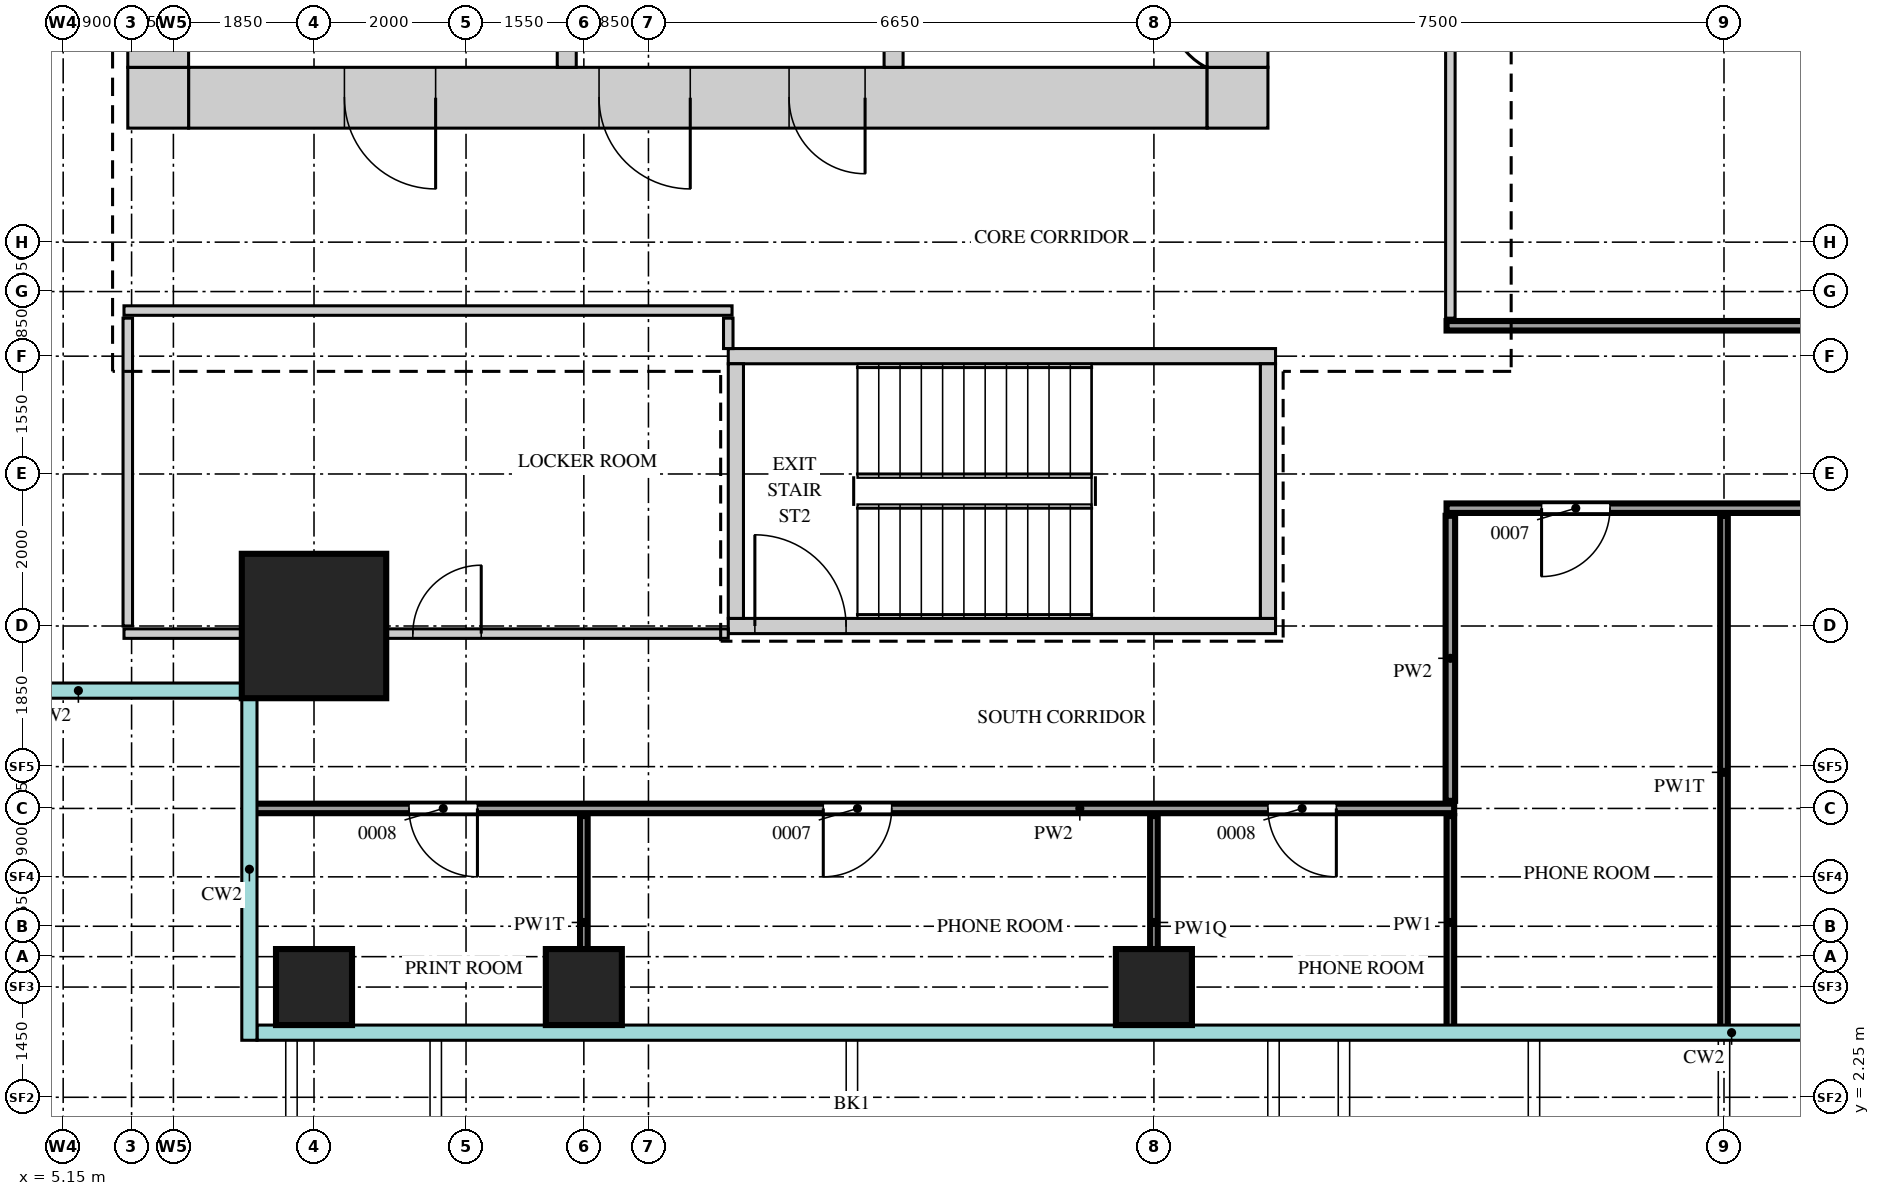
"""IFC4 building model, lengths in metres.
Left out: names, types, materials, properties, quantities, classifications, styles, units other than length and angle.
Written with IfcOpenShell. Run it as: python <this file> out.ifc"""

import sys

from ifc_helpers import new_model, si_unit, direction, frame, frame_2d, origin, origin_2d, place, context, subcontext, project, spatial, rectangle, extrude, source, transform, mapped, element, fill, save


model = new_model("IFC4")
c1 = context("Model", 3, precision=1e-05, world=origin(), true_north=direction((0.0, 1.0)))
c2 = subcontext(c1, "Body", "Model", "MODEL_VIEW")
j1 = project(units=[si_unit("LENGTHUNIT", "METRE"), si_unit("PLANEANGLEUNIT", "RADIAN")], contexts=[c1])
p1 = place(None, origin())
s1 = spatial("IfcSite", under=j1, at=p1, CompositionType="ELEMENT")
p2 = place(p1, origin())
s2 = spatial("IfcBuilding", under=s1, at=p2, CompositionType="ELEMENT")
p3 = place(p2, frame((0.0, 0.0, 188.7)))
s3 = spatial("IfcBuildingStorey", under=s2, at=p3, CompositionType="ELEMENT", Elevation=188.7)
m1 = source(origin(), c2, "Body", "SweptSolid", [
    extrude(rectangle(XDim=13.4, YDim=0.8, at=frame_2d((6.7, 0.0))), origin(), (0.0, 0.0, 1.0), 3.75),
])
p4 = place(p3, frame((6.8, 15.4, 0.0), z_axis=(0.0, 0.0, 1.0), x_axis=(1.0, 0.0, 0.0)))
e1 = element("IfcWall", 1, at=p4, inside=s3, PredefinedType="SHEAR", context=c2, shape_type="MappedRepresentation", body=[
    mapped(m1, transform((0.0, 0.0, 0.0))),
])
m2 = source(origin(), c2, "Body", "SweptSolid", [
    extrude(rectangle(XDim=1.2, YDim=2.1, at=frame_2d((0.6, 1.05))), frame((0.0, 0.41, 0.0), z_axis=(0.0, -1.0, 0.0), x_axis=(1.0, 0.0, 0.0)), (0.0, 0.0, 1.0), 0.82),
])
p5 = place(p4, frame((5.4, 0.0, 0.0)))
e2 = element("IfcOpeningElement", 2, at=p5, cuts=e1, PredefinedType="OPENING", context=c2, shape_type="MappedRepresentation", body=[
    mapped(m2, transform((0.0, 0.0, 0.0))),
])
p6 = place(p4, frame((2.05, 0.0, 0.0)))
e3 = element("IfcOpeningElement", 3, at=p6, cuts=e1, PredefinedType="OPENING", context=c2, shape_type="MappedRepresentation", body=[
    mapped(m2, transform((0.0, 0.0, 0.0))),
])
m3 = source(origin(), c2, "Body", "SweptSolid", [
    extrude(rectangle(XDim=1.0, YDim=2.1, at=frame_2d((0.5, 1.05))), frame((0.0, 0.41, 0.0), z_axis=(0.0, -1.0, 0.0), x_axis=(1.0, 0.0, 0.0)), (0.0, 0.0, 1.0), 0.82),
])
p7 = place(p4, frame((7.9, 0.0, 0.0)))
e4 = element("IfcOpeningElement", 4, at=p7, cuts=e1, PredefinedType="OPENING", context=c2, shape_type="MappedRepresentation", body=[
    mapped(m3, transform((0.0, 0.0, 0.0))),
])
m4 = source(origin(), c2, "Body", "SweptSolid", [
    extrude(rectangle(XDim=0.8, YDim=0.8, at=frame_2d((0.4, 0.0))), origin(), (0.0, 0.0, 1.0), 3.75),
])
for number, where, z_axis, x_axis in (
    (5, (20.2, 15.4, 0.0), (0.0, 0.0, 1.0), (1.0, 0.0, 0.0)),
    (6, (6.0, 15.4, 0.0), (0.0, 0.0, 1.0), (1.0, 0.0, 0.0)),
):
    element("IfcWall", number, at=place(p3, frame(where, z_axis=z_axis, x_axis=x_axis)), inside=s3, PredefinedType="SHEAR", context=c2, shape_type="MappedRepresentation", body=[
        mapped(m4, transform((0.0, 0.0, 0.0))),
    ])
m5 = source(origin(), c2, "Body", "SweptSolid", [
    extrude(rectangle(XDim=22.4, YDim=0.8, at=frame_2d((11.2, 0.0))), origin(), (0.0, 0.0, 1.0), 3.75),
])
p8 = place(p3, frame((20.6, 15.8, 0.0), z_axis=(0.0, 0.0, 1.0), x_axis=(0.0, 1.0, 0.0)))
e7 = element("IfcWall", 7, at=p8, inside=s3, PredefinedType="SHEAR", context=c2, shape_type="MappedRepresentation", body=[
    mapped(m5, transform((0.0, 0.0, 0.0))),
])
m6 = source(origin(), c2, "Body", "SweptSolid", [
    extrude(rectangle(XDim=1.8, YDim=2.1, at=frame_2d((0.9, 1.05))), frame((0.0, 0.41, 0.0), z_axis=(0.0, -1.0, 0.0), x_axis=(1.0, 0.0, 0.0)), (0.0, 0.0, 1.0), 0.82),
])
p9 = place(p8, frame((10.7, 0.0, 0.0)))
e8 = element("IfcOpeningElement", 8, at=p9, cuts=e7, PredefinedType="OPENING", context=c2, shape_type="MappedRepresentation", body=[
    mapped(m6, transform((0.0, 0.0, 0.0))),
])
m7 = source(origin(), c2, "Body", "SweptSolid", [
    extrude(rectangle(XDim=0.9, YDim=2.1, at=frame_2d((0.45, 1.05))), frame((0.0, 0.41, 0.0), z_axis=(0.0, -1.0, 0.0), x_axis=(1.0, 0.0, 0.0)), (0.0, 0.0, 1.0), 0.82),
])
p10 = place(p8, frame((0.35, 0.0, 0.0)))
e9 = element("IfcOpeningElement", 9, at=p10, cuts=e7, PredefinedType="OPENING", context=c2, shape_type="MappedRepresentation", body=[
    mapped(m7, transform((0.0, 0.0, 0.0))),
])
p11 = place(p8, frame((2.15, 0.0, 0.0)))
e10 = element("IfcOpeningElement", 10, at=p11, cuts=e7, PredefinedType="OPENING", context=c2, shape_type="MappedRepresentation", body=[
    mapped(m7, transform((0.0, 0.0, 0.0))),
])
p12 = place(p8, frame((4.85, 0.0, 0.0)))
e11 = element("IfcOpeningElement", 11, at=p12, cuts=e7, PredefinedType="OPENING", context=c2, shape_type="MappedRepresentation", body=[
    mapped(m3, transform((0.0, 0.0, 0.0))),
])
p13 = place(p3, frame((6.4, 15.8, 0.0), z_axis=(0.0, 0.0, 1.0), x_axis=(0.0, 1.0, 0.0)))
e12 = element("IfcWall", 12, at=p13, inside=s3, PredefinedType="SHEAR", context=c2, shape_type="MappedRepresentation", body=[
    mapped(m5, transform((0.0, 0.0, 0.0))),
])
m8 = source(origin(), c2, "Body", "SweptSolid", [
    extrude(rectangle(XDim=7.2, YDim=0.2, at=frame_2d((3.6, 0.0))), origin(), (0.0, 0.0, 1.0), 3.75),
])
p14 = place(p3, frame((13.9, 12.0, 0.0), z_axis=(0.0, 0.0, 1.0), x_axis=(1.0, 0.0, 0.0)))
e13 = element("IfcWall", 13, at=p14, inside=s3, PredefinedType="SHEAR", context=c2, shape_type="MappedRepresentation", body=[
    mapped(m8, transform((0.0, 0.0, 0.0))),
])
p15 = place(p3, frame((13.9, 8.45, 0.0), z_axis=(0.0, 0.0, 1.0), x_axis=(1.0, 0.0, 0.0)))
e14 = element("IfcWall", 14, at=p15, inside=s3, PredefinedType="SHEAR", context=c2, shape_type="MappedRepresentation", body=[
    mapped(m8, transform((0.0, 0.0, 0.0))),
])
m9 = source(origin(), c2, "Body", "SweptSolid", [
    extrude(rectangle(XDim=1.2, YDim=2.1, at=frame_2d((0.6, 1.05))), frame((0.0, 0.11, 0.0), z_axis=(0.0, -1.0, 0.0), x_axis=(1.0, 0.0, 0.0)), (0.0, 0.0, 1.0), 0.22),
])
p16 = place(p15, frame((0.35, 0.0, 0.0)))
e15 = element("IfcOpeningElement", 15, at=p16, cuts=e14, PredefinedType="OPENING", context=c2, shape_type="MappedRepresentation", body=[
    mapped(m9, transform((0.0, 0.0, 0.0))),
])
m10 = source(origin(), c2, "Body", "SweptSolid", [
    extrude(rectangle(XDim=3.35, YDim=0.2, at=frame_2d((1.675, 0.0))), origin(), (0.0, 0.0, 1.0), 3.75),
])
for number, where, z_axis, x_axis in (
    (16, (21.0, 8.55, 0.0), (0.0, 0.0, 1.0), (0.0, 1.0, 0.0)),
    (17, (14.0, 8.55, 0.0), (0.0, 0.0, 1.0), (0.0, 1.0, 0.0)),
):
    element("IfcWall", number, at=place(p3, frame(where, z_axis=z_axis, x_axis=x_axis)), inside=s3, PredefinedType="SHEAR", context=c2, shape_type="MappedRepresentation", body=[
        mapped(m10, transform((0.0, 0.0, 0.0))),
    ])
m11 = source(origin(), c2, "Body", "SweptSolid", [
    extrude(rectangle(XDim=3.4, YDim=0.25, at=frame_2d((1.7, 0.0))), origin(), (0.0, 0.0, 1.0), 3.75),
])
for number, where, z_axis, x_axis in (
    (18, (16.075, 15.8, 0.0), (0.0, 0.0, 1.0), (0.0, 1.0, 0.0)),
    (19, (11.775, 15.8, 0.0), (0.0, 0.0, 1.0), (0.0, 1.0, 0.0)),
):
    element("IfcWall", number, at=place(p3, frame(where, z_axis=z_axis, x_axis=x_axis)), inside=s3, PredefinedType="STANDARD", context=c2, shape_type="MappedRepresentation", body=[
        mapped(m11, transform((0.0, 0.0, 0.0))),
    ])
m12 = source(origin(), c2, "Body", "SweptSolid", [
    extrude(rectangle(XDim=1.9, YDim=1.9, at=origin_2d()), origin(), (0.0, 0.0, 1.0), 4.0),
])
p17 = place(p3, frame((8.45, 8.45, 0.0), z_axis=(0.0, 0.0, 1.0), x_axis=(1.0, 0.0, 0.0)))
e20 = element("IfcColumn", 20, at=p17, inside=s3, PredefinedType="COLUMN", context=c2, shape_type="MappedRepresentation", body=[
    mapped(m12, transform((0.0, 0.0, 0.0))),
])
m13 = source(origin(), c2, "Body", "SweptSolid", [
    extrude(rectangle(XDim=1.0, YDim=1.0, at=origin_2d()), origin(), (0.0, 0.0, 1.0), 3.75),
])
for number, where, z_axis, x_axis in (
    (21, (8.45, 3.7, 0.0), (0.0, 0.0, 1.0), (1.0, 0.0, 0.0)),
    (22, (12.0, 3.7, 0.0), (0.0, 0.0, 1.0), (1.0, 0.0, 0.0)),
    (23, (19.5, 3.7, 0.0), (0.0, 0.0, 1.0), (1.0, 0.0, 0.0)),
):
    element("IfcColumn", number, at=place(p3, frame(where, z_axis=z_axis, x_axis=x_axis)), inside=s3, PredefinedType="COLUMN", context=c2, shape_type="MappedRepresentation", body=[
        mapped(m13, transform((0.0, 0.0, 0.0))),
    ])
m14 = source(origin(), c2, "Body", "SweptSolid", [
    extrude(rectangle(XDim=2.8, YDim=0.1, at=frame_2d((1.4, 0.0))), origin(), (0.0, 0.0, 1.0), 3.3),
])
p18 = place(p3, frame((12.0, 3.15, 0.0), z_axis=(0.0, 0.0, 1.0), x_axis=(0.0, 1.0, 0.0)))
e24 = element("IfcWall", 24, at=p18, inside=s3, PredefinedType="PARTITIONING", context=c2, shape_type="MappedRepresentation", body=[
    mapped(m14, transform((0.0, 0.0, 0.0))),
])
m15 = source(origin(), c2, "Body", "SweptSolid", [
    extrude(rectangle(XDim=2.8, YDim=0.1, at=frame_2d((1.4, 0.0))), origin(), (0.0, 0.0, 1.0), 3.42),
])
p19 = place(p3, frame((19.5, 3.15, 0.0), z_axis=(0.0, 0.0, 1.0), x_axis=(0.0, 1.0, 0.0)))
e25 = element("IfcWall", 25, at=p19, inside=s3, PredefinedType="PARTITIONING", context=c2, shape_type="MappedRepresentation", body=[
    mapped(m15, transform((0.0, 0.0, 0.0))),
])
m16 = source(origin(), c2, "Body", "SweptSolid", [
    extrude(rectangle(XDim=2.8, YDim=0.1, at=frame_2d((1.4, 0.0))), origin(), (0.0, 0.0, 1.0), 3.8),
])
p20 = place(p3, frame((23.4, 3.15, 0.0), z_axis=(0.0, 0.0, 1.0), x_axis=(0.0, 1.0, 0.0)))
e26 = element("IfcWall", 26, at=p20, inside=s3, PredefinedType="PARTITIONING", context=c2, shape_type="MappedRepresentation", body=[
    mapped(m16, transform((0.0, 0.0, 0.0))),
])
m17 = source(origin(), c2, "Body", "SweptSolid", [
    extrude(rectangle(XDim=6.75, YDim=0.1, at=frame_2d((3.375, 0.0))), origin(), (0.0, 0.0, 1.0), 3.3),
])
p21 = place(p3, frame((27.0, 3.15, 0.0), z_axis=(0.0, 0.0, 1.0), x_axis=(0.0, 1.0, 0.0)))
e27 = element("IfcWall", 27, at=p21, inside=s3, PredefinedType="PARTITIONING", context=c2, shape_type="MappedRepresentation", body=[
    mapped(m17, transform((0.0, 0.0, 0.0))),
])
m18 = source(origin(), c2, "Body", "SweptSolid", [
    extrude(rectangle(XDim=15.8, YDim=0.125, at=frame_2d((7.9, 0.0))), origin(), (0.0, 0.0, 1.0), 3.8),
])
p22 = place(p3, frame((7.65, 6.05, 0.0), z_axis=(0.0, 0.0, 1.0), x_axis=(1.0, 0.0, 0.0)))
e28 = element("IfcWall", 28, at=p22, inside=s3, PredefinedType="PARTITIONING", context=c2, shape_type="MappedRepresentation", body=[
    mapped(m18, transform((0.0, 0.0, 0.0))),
])
m19 = source(origin(), c2, "Body", "SweptSolid", [
    extrude(rectangle(XDim=0.9, YDim=2.1, at=frame_2d((0.45, 1.05))), frame((0.0, 0.073, 0.0), z_axis=(0.0, -1.0, 0.0), x_axis=(1.0, 0.0, 0.0)), (0.0, 0.0, 1.0), 0.145),
])
p23 = place(p22, frame((2.05, 0.0, 0.0)))
e29 = element("IfcOpeningElement", 29, at=p23, cuts=e28, PredefinedType="OPENING", context=c2, shape_type="MappedRepresentation", body=[
    mapped(m19, transform((0.0, 0.0, 0.0))),
])
p24 = place(p22, frame((7.5, 0.0, 0.0)))
e30 = element("IfcOpeningElement", 30, at=p24, cuts=e28, PredefinedType="OPENING", context=c2, shape_type="MappedRepresentation", body=[
    mapped(m19, transform((0.0, 0.0, 0.0))),
])
p25 = place(p22, frame((13.35, 0.0, 0.0)))
e31 = element("IfcOpeningElement", 31, at=p25, cuts=e28, PredefinedType="OPENING", context=c2, shape_type="MappedRepresentation", body=[
    mapped(m19, transform((0.0, 0.0, 0.0))),
])
m20 = source(origin(), c2, "Body", "SweptSolid", [
    extrude(rectangle(XDim=3.75, YDim=0.125, at=frame_2d((1.875, 0.0))), origin(), (0.0, 0.0, 1.0), 3.8),
])
p26 = place(p3, frame((23.4, 6.15, 0.0), z_axis=(0.0, 0.0, 1.0), x_axis=(0.0, 1.0, 0.0)))
e32 = element("IfcWall", 32, at=p26, inside=s3, PredefinedType="PARTITIONING", context=c2, shape_type="MappedRepresentation", body=[
    mapped(m20, transform((0.0, 0.0, 0.0))),
])
m21 = source(origin(), c2, "Body", "SweptSolid", [
    extrude(rectangle(XDim=7.95, YDim=0.125, at=frame_2d((3.975, 0.0))), origin(), (0.0, 0.0, 1.0), 3.25),
])
p27 = place(p3, frame((5.95, 8.35, 0.0), z_axis=(0.0, 0.0, 1.0), x_axis=(1.0, 0.0, 0.0)))
e33 = element("IfcWall", 33, at=p27, inside=s3, PredefinedType="PARTITIONING", context=c2, shape_type="MappedRepresentation", body=[
    mapped(m21, transform((0.0, 0.0, 0.0))),
])
p28 = place(p27, frame((3.8, 0.0, 0.0)))
e34 = element("IfcOpeningElement", 34, at=p28, cuts=e33, PredefinedType="OPENING", context=c2, shape_type="MappedRepresentation", body=[
    mapped(m19, transform((0.0, 0.0, 0.0))),
])
m22 = source(origin(), c2, "Body", "SweptSolid", [
    extrude(rectangle(XDim=4.05, YDim=0.125, at=frame_2d((2.025, 0.0))), origin(), (0.0, 0.0, 1.0), 3.8),
])
p29 = place(p3, frame((6.0, 8.45, 0.0), z_axis=(0.0, 0.0, 1.0), x_axis=(0.0, 1.0, 0.0)))
e35 = element("IfcWall", 35, at=p29, inside=s3, PredefinedType="PARTITIONING", context=c2, shape_type="MappedRepresentation", body=[
    mapped(m22, transform((0.0, 0.0, 0.0))),
])
m23 = source(origin(), c2, "Body", "SweptSolid", [
    extrude(rectangle(XDim=20.6, YDim=0.125, at=frame_2d((10.3, 0.0))), origin(), (0.0, 0.0, 1.0), 3.8),
])
p30 = place(p3, frame((23.35, 10.0, 0.0), z_axis=(0.0, 0.0, 1.0), x_axis=(1.0, 0.0, 0.0)))
e36 = element("IfcWall", 36, at=p30, inside=s3, PredefinedType="PARTITIONING", context=c2, shape_type="MappedRepresentation", body=[
    mapped(m23, transform((0.0, 0.0, 0.0))),
])
p31 = place(p30, frame((1.25, 0.0, 0.0)))
e37 = element("IfcOpeningElement", 37, at=p31, cuts=e36, PredefinedType="OPENING", context=c2, shape_type="MappedRepresentation", body=[
    mapped(m19, transform((0.0, 0.0, 0.0))),
])
m24 = source(origin(), c2, "Body", "SweptSolid", [
    extrude(rectangle(XDim=1.2, YDim=2.1, at=frame_2d((0.6, 1.05))), frame((0.0, 0.073, 0.0), z_axis=(0.0, -1.0, 0.0), x_axis=(1.0, 0.0, 0.0)), (0.0, 0.0, 1.0), 0.145),
])
p32 = place(p30, frame((10.55, 0.0, 0.0)))
e38 = element("IfcOpeningElement", 38, at=p32, cuts=e36, PredefinedType="OPENING", context=c2, shape_type="MappedRepresentation", body=[
    mapped(m24, transform((0.0, 0.0, 0.0))),
])
p33 = place(p30, frame((19.05, 0.0, 0.0)))
e39 = element("IfcOpeningElement", 39, at=p33, cuts=e36, PredefinedType="OPENING", context=c2, shape_type="MappedRepresentation", body=[
    mapped(m24, transform((0.0, 0.0, 0.0))),
])
m25 = source(origin(), c2, "Body", "SweptSolid", [
    extrude(rectangle(XDim=0.4, YDim=0.125, at=frame_2d((0.2, 0.0))), origin(), (0.0, 0.0, 1.0), 3.8),
])
p34 = place(p3, frame((13.9, 12.1, 0.0), z_axis=(0.0, 0.0, 1.0), x_axis=(0.0, 1.0, 0.0)))
e40 = element("IfcWall", 40, at=p34, inside=s3, PredefinedType="PARTITIONING", context=c2, shape_type="MappedRepresentation", body=[
    mapped(m25, transform((0.0, 0.0, 0.0))),
])
m26 = source(origin(), c2, "Body", "SweptSolid", [
    extrude(rectangle(XDim=18.3, YDim=0.125, at=frame_2d((9.15, 0.0))), origin(), (0.0, 0.0, 1.0), 3.8),
])
p35 = place(p3, frame((23.35, 12.4, 0.0), z_axis=(0.0, 0.0, 1.0), x_axis=(1.0, 0.0, 0.0)))
e41 = element("IfcWall", 41, at=p35, inside=s3, PredefinedType="PARTITIONING", context=c2, shape_type="MappedRepresentation", body=[
    mapped(m26, transform((0.0, 0.0, 0.0))),
])
m27 = source(origin(), c2, "Body", "SweptSolid", [
    extrude(rectangle(XDim=23.4, YDim=0.125, at=frame_2d((11.7, 0.0))), origin(), (0.0, 0.0, 1.0), 3.8),
])
p36 = place(p3, frame((23.4, 12.5, 0.0), z_axis=(0.0, 0.0, 1.0), x_axis=(0.0, 1.0, 0.0)))
e42 = element("IfcWall", 42, at=p36, inside=s3, PredefinedType="PARTITIONING", context=c2, shape_type="MappedRepresentation", body=[
    mapped(m27, transform((0.0, 0.0, 0.0))),
])
p37 = place(p36, frame((6.6, 0.0, 0.0)))
e43 = element("IfcOpeningElement", 43, at=p37, cuts=e42, PredefinedType="OPENING", context=c2, shape_type="MappedRepresentation", body=[
    mapped(m24, transform((0.0, 0.0, 0.0))),
])
m28 = source(origin(), c2, "Body", "SweptSolid", [
    extrude(rectangle(XDim=8.0, YDim=0.125, at=frame_2d((4.0, 0.0))), origin(), (0.0, 0.0, 1.0), 3.8),
])
p38 = place(p3, frame((5.95, 12.6, 0.0), z_axis=(0.0, 0.0, 1.0), x_axis=(1.0, 0.0, 0.0)))
e44 = element("IfcWall", 44, at=p38, inside=s3, PredefinedType="PARTITIONING", context=c2, shape_type="MappedRepresentation", body=[
    mapped(m28, transform((0.0, 0.0, 0.0))),
])
m29 = source(origin(), c2, "Body", "SweptSolid", [
    extrude(rectangle(XDim=1.2, YDim=2.1, at=frame_2d((0.6, 1.05))), frame((0.0, 0.35, 0.0), z_axis=(0.0, -1.0, 0.0), x_axis=(1.0, 0.0, 0.0)), (0.0, 0.0, 1.0), 0.7),
])
p39 = place(p5, origin())
e45 = element("IfcDoor", 45, at=p39, inside=s3, OperationType="SINGLE_SWING_RIGHT", PredefinedType="DOOR", context=c2, shape_type="MappedRepresentation", body=[
    mapped(m29, transform((0.0, 0.0, 0.0))),
])
fill(e2, e45)
p40 = place(p6, origin())
e46 = element("IfcDoor", 46, at=p40, inside=s3, OperationType="SINGLE_SWING_RIGHT", PredefinedType="DOOR", context=c2, shape_type="MappedRepresentation", body=[
    mapped(m29, transform((0.0, 0.0, 0.0))),
])
fill(e3, e46)
m30 = source(origin(), c2, "Body", "SweptSolid", [
    extrude(rectangle(XDim=1.0, YDim=2.1, at=frame_2d((0.5, 1.05))), frame((0.0, 0.35, 0.0), z_axis=(0.0, -1.0, 0.0), x_axis=(1.0, 0.0, 0.0)), (0.0, 0.0, 1.0), 0.7),
])
p41 = place(p7, origin())
e47 = element("IfcDoor", 47, at=p41, inside=s3, OperationType="SINGLE_SWING_RIGHT", PredefinedType="DOOR", context=c2, shape_type="MappedRepresentation", body=[
    mapped(m30, transform((0.0, 0.0, 0.0))),
])
fill(e4, e47)
m31 = source(origin(), c2, "Body", "SweptSolid", [
    extrude(rectangle(XDim=0.9, YDim=2.1, at=frame_2d((0.45, 1.05))), frame((0.0, 0.025, 0.0), z_axis=(0.0, -1.0, 0.0), x_axis=(1.0, 0.0, 0.0)), (0.0, 0.0, 1.0), 0.05),
])
p42 = place(p31, origin())
e48 = element("IfcDoor", 48, at=p42, inside=s3, OperationType="SINGLE_SWING_LEFT", PredefinedType="DOOR", context=c2, shape_type="MappedRepresentation", body=[
    mapped(m31, transform((0.0, 0.0, 0.0))),
])
fill(e37, e48)
p43 = place(p28, origin())
e49 = element("IfcDoor", 49, at=p43, inside=s3, OperationType="SINGLE_SWING_LEFT", PredefinedType="DOOR", context=c2, shape_type="MappedRepresentation", body=[
    mapped(m31, transform((0.0, 0.0, 0.0))),
])
fill(e34, e49)
p44 = place(p23, origin())
e50 = element("IfcDoor", 50, at=p44, inside=s3, OperationType="SINGLE_SWING_RIGHT", PredefinedType="DOOR", context=c2, shape_type="MappedRepresentation", body=[
    mapped(m31, transform((0.0, 0.0, 0.0))),
])
fill(e29, e50)
p45 = place(p24, origin())
e51 = element("IfcDoor", 51, at=p45, inside=s3, OperationType="SINGLE_SWING_LEFT", PredefinedType="DOOR", context=c2, shape_type="MappedRepresentation", body=[
    mapped(m31, transform((0.0, 0.0, 0.0))),
])
fill(e30, e51)
p46 = place(p25, origin())
e52 = element("IfcDoor", 52, at=p46, inside=s3, OperationType="SINGLE_SWING_RIGHT", PredefinedType="DOOR", context=c2, shape_type="MappedRepresentation", body=[
    mapped(m31, transform((0.0, 0.0, 0.0))),
])
fill(e31, e52)
m32 = source(origin(), c2, "Body", "SweptSolid", [
    extrude(rectangle(XDim=1.2, YDim=2.1, at=frame_2d((0.6, 1.05))), frame((0.0, 0.025, 0.0), z_axis=(0.0, -1.0, 0.0), x_axis=(1.0, 0.0, 0.0)), (0.0, 0.0, 1.0), 0.05),
])
p47 = place(p16, origin())
e53 = element("IfcDoor", 53, at=p47, inside=s3, OperationType="SINGLE_SWING_RIGHT", PredefinedType="DOOR", context=c2, shape_type="MappedRepresentation", body=[
    mapped(m32, transform((0.0, 0.0, 0.0))),
])
fill(e15, e53)
save(model, sys.argv[1])
